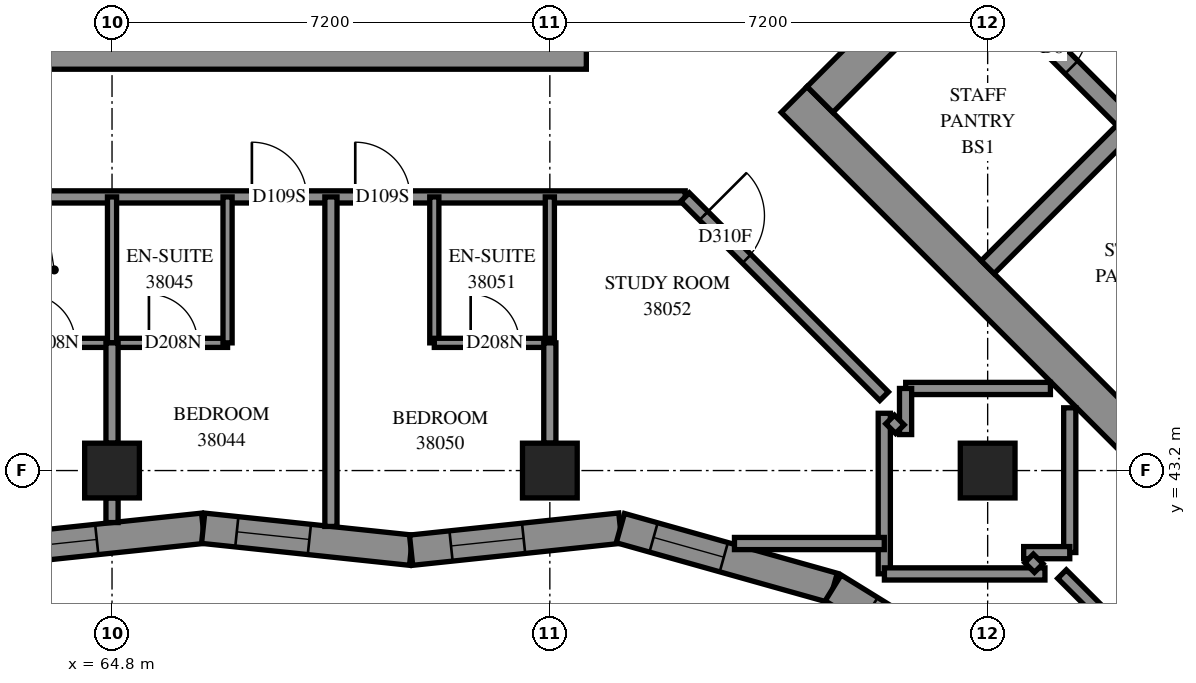
"""IFC4 building model, lengths in metres.
Left out: names, types, materials, properties, quantities, classifications, styles, units other than length and angle.
Written with IfcOpenShell. Run it as: python <this file> out.ifc"""

import sys

from ifc_helpers import new_model, si_unit, direction, frame, frame_2d, origin, origin_2d, place, context, subcontext, project, spatial, polyline, rectangle, outline, extrude, element, fill, save


model = new_model("IFC4")
c1 = context("Model", 3, precision=1e-05, world=origin(), true_north=direction((0.0, 1.0)))
c2 = subcontext(c1, "Body", "Model", "MODEL_VIEW")
j1 = project(units=[si_unit("LENGTHUNIT", "METRE"), si_unit("PLANEANGLEUNIT", "RADIAN")], contexts=[c1])
p1 = place(None, origin())
s1 = spatial("IfcSite", under=j1, at=p1, CompositionType="ELEMENT")
p2 = place(p1, origin())
s2 = spatial("IfcBuilding", under=s1, at=p2, CompositionType="ELEMENT")
p3 = place(p2, frame((0.0, 0.0, 142.2)))
s3 = spatial("IfcBuildingStorey", under=s2, at=p3, CompositionType="ELEMENT", Elevation=142.2)
for number, where, z_axis, x_axis in (
    (1, (64.8, 43.2, 0.0), (0.0, 0.0, 1.0), (1.0, 0.0, 0.0)),
    (2, (72.0, 43.2, 0.0), (0.0, 0.0, 1.0), (1.0, 0.0, 0.0)),
    (3, (79.2, 43.2, 0.0), (0.0, 0.0, 1.0), (1.0, 0.0, 0.0)),
):
    element("IfcColumn", number, at=place(p3, frame(where, z_axis=z_axis, x_axis=x_axis)), inside=s3, PredefinedType="COLUMN", context=c2, shape_type="SweptSolid", body=[
        extrude(rectangle(XDim=0.9, YDim=0.9, at=origin_2d()), origin(), (0.0, 0.0, 1.0), 3.1),
    ])
for number, where, z_axis, x_axis in (
    (4, (57.0, 50.1, -0.3), (0.0, 0.0, 1.0), (1.0, 0.0, 0.0)),
    (5, (76.018, 49.302, -0.3), (0.0, 0.0, 1.0), (0.707, -0.707, 0.0)),
):
    element("IfcWall", number, at=place(p3, frame(where, z_axis=z_axis, x_axis=x_axis)), inside=s3, PredefinedType="SHEAR", context=c2, shape_type="SweptSolid", body=[
        extrude(rectangle(XDim=15.6, YDim=0.6, at=frame_2d((7.8, 0.0))), origin(), (0.0, 0.0, 1.0), 2.7),
    ])
p4 = place(p3, frame((76.442, 49.302, -0.3), z_axis=(0.0, 0.0, 1.0), x_axis=(0.7071067812, 0.7071067812, 0.0)))
e6 = element("IfcWall", 6, at=p4, inside=s3, PredefinedType="SHEAR", context=c2, shape_type="SweptSolid", body=[
    extrude(rectangle(XDim=14.4, YDim=0.6, at=frame_2d((7.2, 0.0))), origin(), (0.0, 0.0, 1.0), 2.7),
])
p5 = place(p4, frame((4.55, 0.0, 0.3)))
e7 = element("IfcOpeningElement", 7, at=p5, cuts=e6, PredefinedType="OPENING", context=c2, shape_type="SweptSolid", body=[
    extrude(rectangle(XDim=1.1, YDim=2.1, at=frame_2d((0.55, 1.05))), frame((0.0, 0.31, 0.0), z_axis=(0.0, -1.0, 0.0), x_axis=(1.0, 0.0, 0.0)), (0.0, 0.0, 1.0), 0.62),
])
p6 = place(p4, frame((11.35, 0.0, 0.3)))
e8 = element("IfcOpeningElement", 8, at=p6, cuts=e6, PredefinedType="OPENING", context=c2, shape_type="SweptSolid", body=[
    extrude(rectangle(XDim=1.1, YDim=2.1, at=frame_2d((0.55, 1.05))), frame((0.0, 0.31, 0.0), z_axis=(0.0, -1.0, 0.0), x_axis=(1.0, 0.0, 0.0)), (0.0, 0.0, 1.0), 0.62),
])
p7 = place(p3, frame((79.2, 46.544, 0.0), z_axis=(0.0, 0.0, 1.0), x_axis=(0.7071219326, 0.7070916295, 0.0)))
e9 = element("IfcWall", 9, at=p7, inside=s3, PredefinedType="SOLIDWALL", context=c2, shape_type="SweptSolid", body=[
    extrude(rectangle(XDim=3.3, YDim=0.3, at=frame_2d((1.65, 0.0))), origin(), (0.0, 0.0, 1.0), 3.1),
])
p8 = place(p3, frame((78.988, 51.423, 0.0), z_axis=(0.0, 0.0, 1.0), x_axis=(0.7071067812, -0.7071067812, 0.0)))
e10 = element("IfcWall", 10, at=p8, inside=s3, PredefinedType="SOLIDWALL", context=c2, shape_type="SweptSolid", body=[
    extrude(rectangle(XDim=14.4, YDim=0.3, at=frame_2d((7.2, 0.0))), origin(), (0.0, 0.0, 1.0), 3.1),
])
p9 = place(p8, frame((1.35, 0.0, 0.0)))
e11 = element("IfcOpeningElement", 11, at=p9, cuts=e10, PredefinedType="OPENING", context=c2, shape_type="SweptSolid", body=[
    extrude(rectangle(XDim=0.9, YDim=2.1, at=frame_2d((0.45, 1.05))), frame((0.0, 0.16, 0.0), z_axis=(0.0, -1.0, 0.0), x_axis=(1.0, 0.0, 0.0)), (0.0, 0.0, 1.0), 0.32),
])
p10 = place(p8, frame((4.95, 0.0, 0.0)))
e12 = element("IfcOpeningElement", 12, at=p10, cuts=e10, PredefinedType="OPENING", context=c2, shape_type="SweptSolid", body=[
    extrude(rectangle(XDim=0.9, YDim=2.1, at=frame_2d((0.45, 1.05))), frame((0.0, 0.16, 0.0), z_axis=(0.0, -1.0, 0.0), x_axis=(1.0, 0.0, 0.0)), (0.0, 0.0, 1.0), 0.32),
])
p11 = place(p8, frame((8.55, 0.0, 0.0)))
e13 = element("IfcOpeningElement", 13, at=p11, cuts=e10, PredefinedType="OPENING", context=c2, shape_type="SweptSolid", body=[
    extrude(rectangle(XDim=0.9, YDim=2.1, at=frame_2d((0.45, 1.05))), frame((0.0, 0.16, 0.0), z_axis=(0.0, -1.0, 0.0), x_axis=(1.0, 0.0, 0.0)), (0.0, 0.0, 1.0), 0.32),
])
p12 = place(p8, frame((12.05, 0.0, 0.0)))
e14 = element("IfcOpeningElement", 14, at=p12, cuts=e10, PredefinedType="OPENING", context=c2, shape_type="SweptSolid", body=[
    extrude(rectangle(XDim=1.1, YDim=2.1, at=frame_2d((0.55, 1.05))), frame((0.0, 0.16, 0.0), z_axis=(0.0, -1.0, 0.0), x_axis=(1.0, 0.0, 0.0)), (0.0, 0.0, 1.0), 0.32),
])
p13 = place(p3, frame((62.879, 41.89, 0.0), z_axis=(0.0, 0.0, 1.0), x_axis=(0.9944744972, 0.1049784471, 0.0)))
e15 = element("IfcWall", 15, at=p13, inside=s3, PredefinedType="SOLIDWALL", context=c2, shape_type="SweptSolid", body=[
    extrude(outline(polyline([(-0.026, -0.25), (3.412, -0.25), (3.465, 0.25), (0.026, 0.25), (-0.026, -0.25)])), origin(), (0.0, 0.0, 1.0), 3.1),
])
p14 = place(p13, frame((0.479, 0.0, 0.45)))
e16 = element("IfcOpeningElement", 16, at=p14, cuts=e15, PredefinedType="OPENING", context=c2, shape_type="SweptSolid", body=[
    extrude(rectangle(XDim=1.2, YDim=2.5, at=frame_2d((0.6, 1.25))), frame((0.0, 0.26, 0.0), z_axis=(0.0, -1.0, 0.0), x_axis=(1.0, 0.0, 0.0)), (0.0, 0.0, 1.0), 0.52),
])
p15 = place(p3, frame((66.299, 42.251, 0.0), z_axis=(0.0, 0.0, 1.0), x_axis=(0.9944741767, -0.1049814831, 0.0)))
e17 = element("IfcWall", 17, at=p15, inside=s3, PredefinedType="SOLIDWALL", context=c2, shape_type="SweptSolid", body=[
    extrude(outline(polyline([(0.026, -0.25), (3.465, -0.25), (3.412, 0.25), (-0.026, 0.25), (0.026, -0.25)])), origin(), (0.0, 0.0, 1.0), 3.1),
])
p16 = place(p15, frame((0.556, 0.0, 0.45)))
e18 = element("IfcOpeningElement", 18, at=p16, cuts=e17, PredefinedType="OPENING", context=c2, shape_type="SweptSolid", body=[
    extrude(rectangle(XDim=1.2, YDim=2.5, at=frame_2d((0.6, 1.25))), frame((0.0, 0.26, 0.0), z_axis=(0.0, -1.0, 0.0), x_axis=(1.0, 0.0, 0.0)), (0.0, 0.0, 1.0), 0.52),
])
p17 = place(p3, frame((69.718, 41.89, 0.0), z_axis=(0.0, 0.0, 1.0), x_axis=(0.9944732608, 0.1049901591, 0.0)))
e19 = element("IfcWall", 19, at=p17, inside=s3, PredefinedType="SOLIDWALL", context=c2, shape_type="SweptSolid", body=[
    extrude(outline(polyline([(-0.026, -0.25), (3.412, -0.25), (3.508, 0.25), (0.026, 0.25), (-0.026, -0.25)])), origin(), (0.0, 0.0, 1.0), 3.1),
])
p18 = place(p17, frame((0.66, 0.0, 0.45)))
e20 = element("IfcOpeningElement", 20, at=p18, cuts=e19, PredefinedType="OPENING", context=c2, shape_type="SweptSolid", body=[
    extrude(rectangle(XDim=1.2, YDim=2.5, at=frame_2d((0.6, 1.25))), frame((0.0, 0.26, 0.0), z_axis=(0.0, -1.0, 0.0), x_axis=(1.0, 0.0, 0.0)), (0.0, 0.0, 1.0), 0.52),
])
p19 = place(p3, frame((73.16, 42.254, 0.0), z_axis=(0.0, 0.0, 1.0), x_axis=(0.9627076036, -0.2705440261, 0.0)))
e21 = element("IfcWall", 21, at=p19, inside=s3, PredefinedType="SOLIDWALL", context=c2, shape_type="SweptSolid", body=[
    extrude(outline(polyline([(0.048, -0.25), (3.6, -0.25), (3.67, 0.25), (-0.048, 0.25), (0.048, -0.25)])), origin(), (0.0, 0.0, 1.0), 3.1),
])
p20 = place(p19, frame((0.568, 0.0, 0.45)))
e22 = element("IfcOpeningElement", 22, at=p20, cuts=e21, PredefinedType="OPENING", context=c2, shape_type="SweptSolid", body=[
    extrude(rectangle(XDim=1.2, YDim=2.5, at=frame_2d((0.6, 1.25))), frame((0.0, 0.26, 0.0), z_axis=(0.0, -1.0, 0.0), x_axis=(1.0, 0.0, 0.0)), (0.0, 0.0, 1.0), 0.52),
])
p21 = place(p3, frame((76.659, 41.27, 0.0), z_axis=(0.0, 0.0, 1.0), x_axis=(0.8508843037, -0.5253531209, 0.0)))
e23 = element("IfcWall", 23, at=p21, inside=s3, PredefinedType="SOLIDWALL", context=c2, shape_type="SweptSolid", body=[
    extrude(outline(polyline([(0.035, -0.25), (4.21, -0.25), (4.291, 0.25), (-0.035, 0.25), (0.035, -0.25)])), origin(), (0.0, 0.0, 1.0), 3.1),
])
p22 = place(p21, frame((0.707, 0.0, 0.45)))
e24 = element("IfcOpeningElement", 24, at=p22, cuts=e23, PredefinedType="OPENING", context=c2, shape_type="SweptSolid", body=[
    extrude(rectangle(XDim=1.2, YDim=2.5, at=frame_2d((0.6, 1.25))), frame((0.0, 0.26, 0.0), z_axis=(0.0, -1.0, 0.0), x_axis=(1.0, 0.0, 0.0)), (0.0, 0.0, 1.0), 0.52),
])
p23 = place(p21, frame((2.282, 0.0, 0.45)))
e25 = element("IfcOpeningElement", 25, at=p23, cuts=e23, PredefinedType="OPENING", context=c2, shape_type="SweptSolid", body=[
    extrude(rectangle(XDim=1.2, YDim=2.5, at=frame_2d((0.6, 1.25))), frame((0.0, 0.26, 0.0), z_axis=(0.0, -1.0, 0.0), x_axis=(1.0, 0.0, 0.0)), (0.0, 0.0, 1.0), 0.52),
])
p24 = place(p3, frame((54.9, 47.7, 0.0), z_axis=(0.0, 0.0, 1.0), x_axis=(1.0, 0.0, 0.0)))
e26 = element("IfcWall", 26, at=p24, inside=s3, PredefinedType="PARTITIONING", context=c2, shape_type="SweptSolid", body=[
    extrude(rectangle(XDim=19.326, YDim=0.2, at=frame_2d((9.663, 0.0))), origin(), (0.0, 0.0, 1.0), 3.1),
])
p25 = place(p24, frame((5.0, 0.0, 0.0)))
e27 = element("IfcOpeningElement", 27, at=p25, cuts=e26, PredefinedType="OPENING", context=c2, shape_type="SweptSolid", body=[
    extrude(rectangle(XDim=0.9, YDim=2.1, at=frame_2d((0.45, 1.05))), frame((0.0, 0.11, 0.0), z_axis=(0.0, -1.0, 0.0), x_axis=(1.0, 0.0, 0.0)), (0.0, 0.0, 1.0), 0.22),
])
p26 = place(p24, frame((12.2, 0.0, 0.0)))
e28 = element("IfcOpeningElement", 28, at=p26, cuts=e26, PredefinedType="OPENING", context=c2, shape_type="SweptSolid", body=[
    extrude(rectangle(XDim=0.9, YDim=2.1, at=frame_2d((0.45, 1.05))), frame((0.0, 0.11, 0.0), z_axis=(0.0, -1.0, 0.0), x_axis=(1.0, 0.0, 0.0)), (0.0, 0.0, 1.0), 0.22),
])
p27 = place(p24, frame((6.7, 0.0, 0.0)))
e29 = element("IfcOpeningElement", 29, at=p27, cuts=e26, PredefinedType="OPENING", context=c2, shape_type="SweptSolid", body=[
    extrude(rectangle(XDim=0.9, YDim=2.1, at=frame_2d((0.45, 1.05))), frame((0.0, 0.11, 0.0), z_axis=(0.0, -1.0, 0.0), x_axis=(1.0, 0.0, 0.0)), (0.0, 0.0, 1.0), 0.22),
])
p28 = place(p24, frame((13.9, 0.0, 0.0)))
e30 = element("IfcOpeningElement", 30, at=p28, cuts=e26, PredefinedType="OPENING", context=c2, shape_type="SweptSolid", body=[
    extrude(rectangle(XDim=0.9, YDim=2.1, at=frame_2d((0.45, 1.05))), frame((0.0, 0.11, 0.0), z_axis=(0.0, -1.0, 0.0), x_axis=(1.0, 0.0, 0.0)), (0.0, 0.0, 1.0), 0.22),
])
p29 = place(p3, frame((80.423, 41.497, 0.0), z_axis=(0.0, 0.0, 1.0), x_axis=(0.7071067812, -0.7071067812, 0.0)))
e31 = element("IfcWall", 31, at=p29, inside=s3, PredefinedType="PARTITIONING", context=c2, shape_type="SweptSolid", body=[
    extrude(rectangle(XDim=9.065, YDim=0.2, at=frame_2d((4.532, 0.0))), origin(), (0.0, 0.0, 1.0), 3.1),
])
p30 = place(p3, frame((68.4, 42.281, 0.0), z_axis=(0.0, 0.0, 1.0), x_axis=(0.0, 1.0, 0.0)))
e32 = element("IfcWall", 32, at=p30, inside=s3, PredefinedType="PARTITIONING", context=c2, shape_type="SweptSolid", body=[
    extrude(rectangle(XDim=5.419, YDim=0.2, at=frame_2d((2.709, 0.0))), origin(), (0.0, 0.0, 1.0), 3.1),
])
p31 = place(p3, frame((74.223, 47.697, 0.0), z_axis=(0.0, 0.0, 1.0), x_axis=(0.7071067812, -0.7071067812, 0.0)))
e33 = element("IfcWall", 33, at=p31, inside=s3, PredefinedType="PARTITIONING", context=c2, shape_type="SweptSolid", body=[
    extrude(rectangle(XDim=4.63, YDim=0.2, at=frame_2d((2.315, 0.0))), origin(), (0.0, 0.0, 1.0), 3.1),
])
p32 = place(p31, frame((0.434, 0.0, 0.0)))
e34 = element("IfcOpeningElement", 34, at=p32, cuts=e33, PredefinedType="OPENING", context=c2, shape_type="SweptSolid", body=[
    extrude(rectangle(XDim=1.0, YDim=2.1, at=frame_2d((0.5, 1.05))), frame((0.0, 0.11, 0.0), z_axis=(0.0, -1.0, 0.0), x_axis=(1.0, 0.0, 0.0)), (0.0, 0.0, 1.0), 0.22),
])
p33 = place(p3, frame((62.9, 45.3, 0.0), z_axis=(0.0, 0.0, 1.0), x_axis=(1.0, 0.0, 0.0)))
e35 = element("IfcWall", 35, at=p33, inside=s3, PredefinedType="PARTITIONING", context=c2, shape_type="SweptSolid", body=[
    extrude(rectangle(XDim=3.8, YDim=0.15, at=frame_2d((1.9, 0.0))), origin(), (0.0, 0.0, 1.0), 3.1),
])
p34 = place(p33, frame((2.507, 0.0, 0.0)))
e36 = element("IfcOpeningElement", 36, at=p34, cuts=e35, PredefinedType="OPENING", context=c2, shape_type="SweptSolid", body=[
    extrude(rectangle(XDim=0.8, YDim=2.1, at=frame_2d((0.4, 1.05))), frame((0.0, 0.085, 0.0), z_axis=(0.0, -1.0, 0.0), x_axis=(1.0, 0.0, 0.0)), (0.0, 0.0, 1.0), 0.17),
])
p35 = place(p33, frame((0.493, 0.0, 0.0)))
e37 = element("IfcOpeningElement", 37, at=p35, cuts=e35, PredefinedType="OPENING", context=c2, shape_type="SweptSolid", body=[
    extrude(rectangle(XDim=0.8, YDim=2.1, at=frame_2d((0.4, 1.05))), frame((0.0, 0.085, 0.0), z_axis=(0.0, -1.0, 0.0), x_axis=(1.0, 0.0, 0.0)), (0.0, 0.0, 1.0), 0.17),
])
for number, where, z_axis, x_axis in (
    (38, (77.5, 41.502, 0.0), (0.0, 0.0, 1.0), (0.0, 1.0, 0.0)),
    (39, (77.502, 41.5, 0.0), (0.0, 0.0, 1.0), (1.0, 0.0, 0.0)),
):
    element("IfcWall", number, at=place(p3, frame(where, z_axis=z_axis, x_axis=x_axis)), inside=s3, PredefinedType="PARTITIONING", context=c2, shape_type="SweptSolid", body=[
        extrude(rectangle(XDim=2.64, YDim=0.2, at=frame_2d((1.32, 0.0))), origin(), (0.0, 0.0, 1.0), 3.1),
    ])
p36 = place(p3, frame((75.036, 42.0, 0.0), z_axis=(0.0, 0.0, 1.0), x_axis=(1.0, 0.0, 0.0)))
e40 = element("IfcWall", 40, at=p36, inside=s3, PredefinedType="PARTITIONING", context=c2, shape_type="SweptSolid", body=[
    extrude(rectangle(XDim=2.464, YDim=0.2, at=frame_2d((1.232, 0.0))), origin(), (0.0, 0.0, 1.0), 3.1),
])
for number, where, z_axis, x_axis in (
    (41, (66.7, 45.3, 0.0), (0.0, 0.0, 1.0), (0.0, 1.0, 0.0)),
    (42, (64.8, 45.3, 0.0), (0.0, 0.0, 1.0), (0.0, 1.0, 0.0)),
    (43, (70.1, 45.3, 0.0), (0.0, 0.0, 1.0), (0.0, 1.0, 0.0)),
    (44, (72.0, 45.3, 0.0), (0.0, 0.0, 1.0), (0.0, 1.0, 0.0)),
):
    element("IfcWall", number, at=place(p3, frame(where, z_axis=z_axis, x_axis=x_axis)), inside=s3, PredefinedType="PARTITIONING", context=c2, shape_type="SweptSolid", body=[
        extrude(rectangle(XDim=2.4, YDim=0.15, at=frame_2d((1.2, 0.0))), origin(), (0.0, 0.0, 1.0), 3.1),
    ])
for number, where, z_axis, x_axis in (
    (45, (80.55, 41.852, 0.0), (0.0, 0.0, 1.0), (0.0, 1.0, 0.0)),
    (46, (77.852, 44.55, 0.0), (0.0, 0.0, 1.0), (1.0, 0.0, 0.0)),
):
    element("IfcWall", number, at=place(p3, frame(where, z_axis=z_axis, x_axis=x_axis)), inside=s3, PredefinedType="PARTITIONING", context=c2, shape_type="SweptSolid", body=[
        extrude(rectangle(XDim=2.38, YDim=0.2, at=frame_2d((1.19, 0.0))), origin(), (0.0, 0.0, 1.0), 3.1),
    ])
p37 = place(p3, frame((70.1, 45.3, 0.0), z_axis=(0.0, 0.0, 1.0), x_axis=(1.0, 0.0, 0.0)))
e47 = element("IfcWall", 47, at=p37, inside=s3, PredefinedType="PARTITIONING", context=c2, shape_type="SweptSolid", body=[
    extrude(rectangle(XDim=1.9, YDim=0.15, at=frame_2d((0.95, 0.0))), origin(), (0.0, 0.0, 1.0), 3.1),
])
p38 = place(p37, frame((0.598, 0.0, 0.0)))
e48 = element("IfcOpeningElement", 48, at=p38, cuts=e47, PredefinedType="OPENING", context=c2, shape_type="SweptSolid", body=[
    extrude(rectangle(XDim=0.8, YDim=2.1, at=frame_2d((0.4, 1.05))), frame((0.0, 0.085, 0.0), z_axis=(0.0, -1.0, 0.0), x_axis=(1.0, 0.0, 0.0)), (0.0, 0.0, 1.0), 0.17),
])
for number, where, z_axis, x_axis in (
    (49, (64.8, 43.65, 0.0), (0.0, 0.0, 1.0), (0.0, 1.0, 0.0)),
    (50, (72.0, 43.65, 0.0), (0.0, 0.0, 1.0), (0.0, 1.0, 0.0)),
):
    element("IfcWall", number, at=place(p3, frame(where, z_axis=z_axis, x_axis=x_axis)), inside=s3, PredefinedType="PARTITIONING", context=c2, shape_type="SweptSolid", body=[
        extrude(rectangle(XDim=1.65, YDim=0.2, at=frame_2d((0.825, 0.0))), origin(), (0.0, 0.0, 1.0), 3.1),
    ])
for number, where, z_axis, x_axis in (
    (51, (77.85, 43.792, 0.0), (0.0, 0.0, 1.0), (0.0, 1.0, 0.0)),
    (52, (79.792, 41.85, 0.0), (0.0, 0.0, 1.0), (1.0, 0.0, 0.0)),
):
    element("IfcWall", number, at=place(p3, frame(where, z_axis=z_axis, x_axis=x_axis)), inside=s3, PredefinedType="PARTITIONING", context=c2, shape_type="SweptSolid", body=[
        extrude(rectangle(XDim=0.758, YDim=0.2, at=frame_2d((0.379, 0.0))), origin(), (0.0, 0.0, 1.0), 3.1),
    ])
for number, where, z_axis, x_axis in (
    (53, (79.881, 41.755, 0.0), (0.0, 0.0, 1.0), (0.707, -0.707, 0.0)),
    (54, (77.596, 44.04, 0.0), (0.0, 0.0, 1.0), (0.707, -0.707, 0.0)),
):
    element("IfcWall", number, at=place(p3, frame(where, z_axis=z_axis, x_axis=x_axis)), inside=s3, PredefinedType="PARTITIONING", context=c2, shape_type="SweptSolid", body=[
        extrude(rectangle(XDim=0.225, YDim=0.2, at=frame_2d((0.113, 0.0))), origin(), (0.0, 0.0, 1.0), 3.1),
    ])
p39 = place(p3, frame((64.8, 42.345, 0.0), z_axis=(0.0, 0.0, 1.0), x_axis=(0.0, 1.0, 0.0)))
e55 = element("IfcWall", 55, at=p39, inside=s3, PredefinedType="PARTITIONING", context=c2, shape_type="SweptSolid", body=[
    extrude(rectangle(XDim=0.405, YDim=0.2, at=frame_2d((0.203, 0.0))), origin(), (0.0, 0.0, 1.0), 3.1),
])
p40 = place(p14, origin())
e56 = element("IfcWindow", 56, at=p40, inside=s3, PartitioningType="SINGLE_PANEL", PredefinedType="WINDOW", context=c2, shape_type="SweptSolid", body=[
    extrude(rectangle(XDim=1.2, YDim=2.5, at=frame_2d((0.6, 1.25))), frame((0.0, 0.18, 0.0), z_axis=(0.0, -1.0, 0.0), x_axis=(1.0, 0.0, 0.0)), (0.0, 0.0, 1.0), 0.06),
])
fill(e16, e56)
p41 = place(p16, origin())
e57 = element("IfcWindow", 57, at=p41, inside=s3, PartitioningType="SINGLE_PANEL", PredefinedType="WINDOW", context=c2, shape_type="SweptSolid", body=[
    extrude(rectangle(XDim=1.2, YDim=2.5, at=frame_2d((0.6, 1.25))), frame((0.0, 0.18, 0.0), z_axis=(0.0, -1.0, 0.0), x_axis=(1.0, 0.0, 0.0)), (0.0, 0.0, 1.0), 0.06),
])
fill(e18, e57)
p42 = place(p18, origin())
e58 = element("IfcWindow", 58, at=p42, inside=s3, PartitioningType="SINGLE_PANEL", PredefinedType="WINDOW", context=c2, shape_type="SweptSolid", body=[
    extrude(rectangle(XDim=1.2, YDim=2.5, at=frame_2d((0.6, 1.25))), frame((0.0, 0.18, 0.0), z_axis=(0.0, -1.0, 0.0), x_axis=(1.0, 0.0, 0.0)), (0.0, 0.0, 1.0), 0.06),
])
fill(e20, e58)
p43 = place(p20, origin())
e59 = element("IfcWindow", 59, at=p43, inside=s3, PartitioningType="SINGLE_PANEL", PredefinedType="WINDOW", context=c2, shape_type="SweptSolid", body=[
    extrude(rectangle(XDim=1.2, YDim=2.5, at=frame_2d((0.6, 1.25))), frame((0.0, 0.18, 0.0), z_axis=(0.0, -1.0, 0.0), x_axis=(1.0, 0.0, 0.0)), (0.0, 0.0, 1.0), 0.06),
])
fill(e22, e59)
p44 = place(p22, origin())
e60 = element("IfcWindow", 60, at=p44, inside=s3, PartitioningType="SINGLE_PANEL", PredefinedType="WINDOW", context=c2, shape_type="SweptSolid", body=[
    extrude(rectangle(XDim=1.2, YDim=2.5, at=frame_2d((0.6, 1.25))), frame((0.0, 0.18, 0.0), z_axis=(0.0, -1.0, 0.0), x_axis=(1.0, 0.0, 0.0)), (0.0, 0.0, 1.0), 0.06),
])
fill(e24, e60)
p45 = place(p9, origin())
e61 = element("IfcDoor", 61, at=p45, inside=s3, OperationType="SINGLE_SWING_LEFT", PredefinedType="DOOR", context=c2, shape_type="SweptSolid", body=[
    extrude(rectangle(XDim=0.9, YDim=2.1, at=frame_2d((0.45, 1.05))), frame((0.0, 0.025, 0.0), z_axis=(0.0, -1.0, 0.0), x_axis=(1.0, 0.0, 0.0)), (0.0, 0.0, 1.0), 0.05),
])
fill(e11, e61)
p46 = place(p26, origin())
e62 = element("IfcDoor", 62, at=p46, inside=s3, OperationType="SINGLE_SWING_LEFT", PredefinedType="DOOR", context=c2, shape_type="SweptSolid", body=[
    extrude(rectangle(XDim=0.9, YDim=2.1, at=frame_2d((0.45, 1.05))), frame((0.0, 0.025, 0.0), z_axis=(0.0, -1.0, 0.0), x_axis=(1.0, 0.0, 0.0)), (0.0, 0.0, 1.0), 0.05),
])
fill(e28, e62)
p47 = place(p34, origin())
e63 = element("IfcDoor", 63, at=p47, inside=s3, OperationType="SINGLE_SWING_RIGHT", PredefinedType="DOOR", context=c2, shape_type="SweptSolid", body=[
    extrude(rectangle(XDim=0.8, YDim=2.1, at=frame_2d((0.4, 1.05))), frame((0.0, 0.025, 0.0), z_axis=(0.0, -1.0, 0.0), x_axis=(1.0, 0.0, 0.0)), (0.0, 0.0, 1.0), 0.05),
])
fill(e36, e63)
p48 = place(p35, origin())
e64 = element("IfcDoor", 64, at=p48, inside=s3, OperationType="SINGLE_SWING_RIGHT", PredefinedType="DOOR", context=c2, shape_type="SweptSolid", body=[
    extrude(rectangle(XDim=0.8, YDim=2.1, at=frame_2d((0.4, 1.05))), frame((0.0, 0.025, 0.0), z_axis=(0.0, -1.0, 0.0), x_axis=(1.0, 0.0, 0.0)), (0.0, 0.0, 1.0), 0.05),
])
fill(e37, e64)
p49 = place(p28, origin())
e65 = element("IfcDoor", 65, at=p49, inside=s3, OperationType="SINGLE_SWING_RIGHT", PredefinedType="DOOR", context=c2, shape_type="SweptSolid", body=[
    extrude(rectangle(XDim=0.9, YDim=2.1, at=frame_2d((0.45, 1.05))), frame((0.0, 0.025, 0.0), z_axis=(0.0, -1.0, 0.0), x_axis=(1.0, 0.0, 0.0)), (0.0, 0.0, 1.0), 0.05),
])
fill(e30, e65)
p50 = place(p38, origin())
e66 = element("IfcDoor", 66, at=p50, inside=s3, OperationType="SINGLE_SWING_RIGHT", PredefinedType="DOOR", context=c2, shape_type="SweptSolid", body=[
    extrude(rectangle(XDim=0.8, YDim=2.1, at=frame_2d((0.4, 1.05))), frame((0.0, 0.025, 0.0), z_axis=(0.0, -1.0, 0.0), x_axis=(1.0, 0.0, 0.0)), (0.0, 0.0, 1.0), 0.05),
])
fill(e48, e66)
p51 = place(p32, origin())
e67 = element("IfcDoor", 67, at=p51, inside=s3, OperationType="SINGLE_SWING_LEFT", PredefinedType="DOOR", context=c2, shape_type="SweptSolid", body=[
    extrude(rectangle(XDim=1.0, YDim=2.1, at=frame_2d((0.5, 1.05))), frame((0.0, 0.025, 0.0), z_axis=(0.0, -1.0, 0.0), x_axis=(1.0, 0.0, 0.0)), (0.0, 0.0, 1.0), 0.05),
])
fill(e34, e67)
save(model, sys.argv[1])
